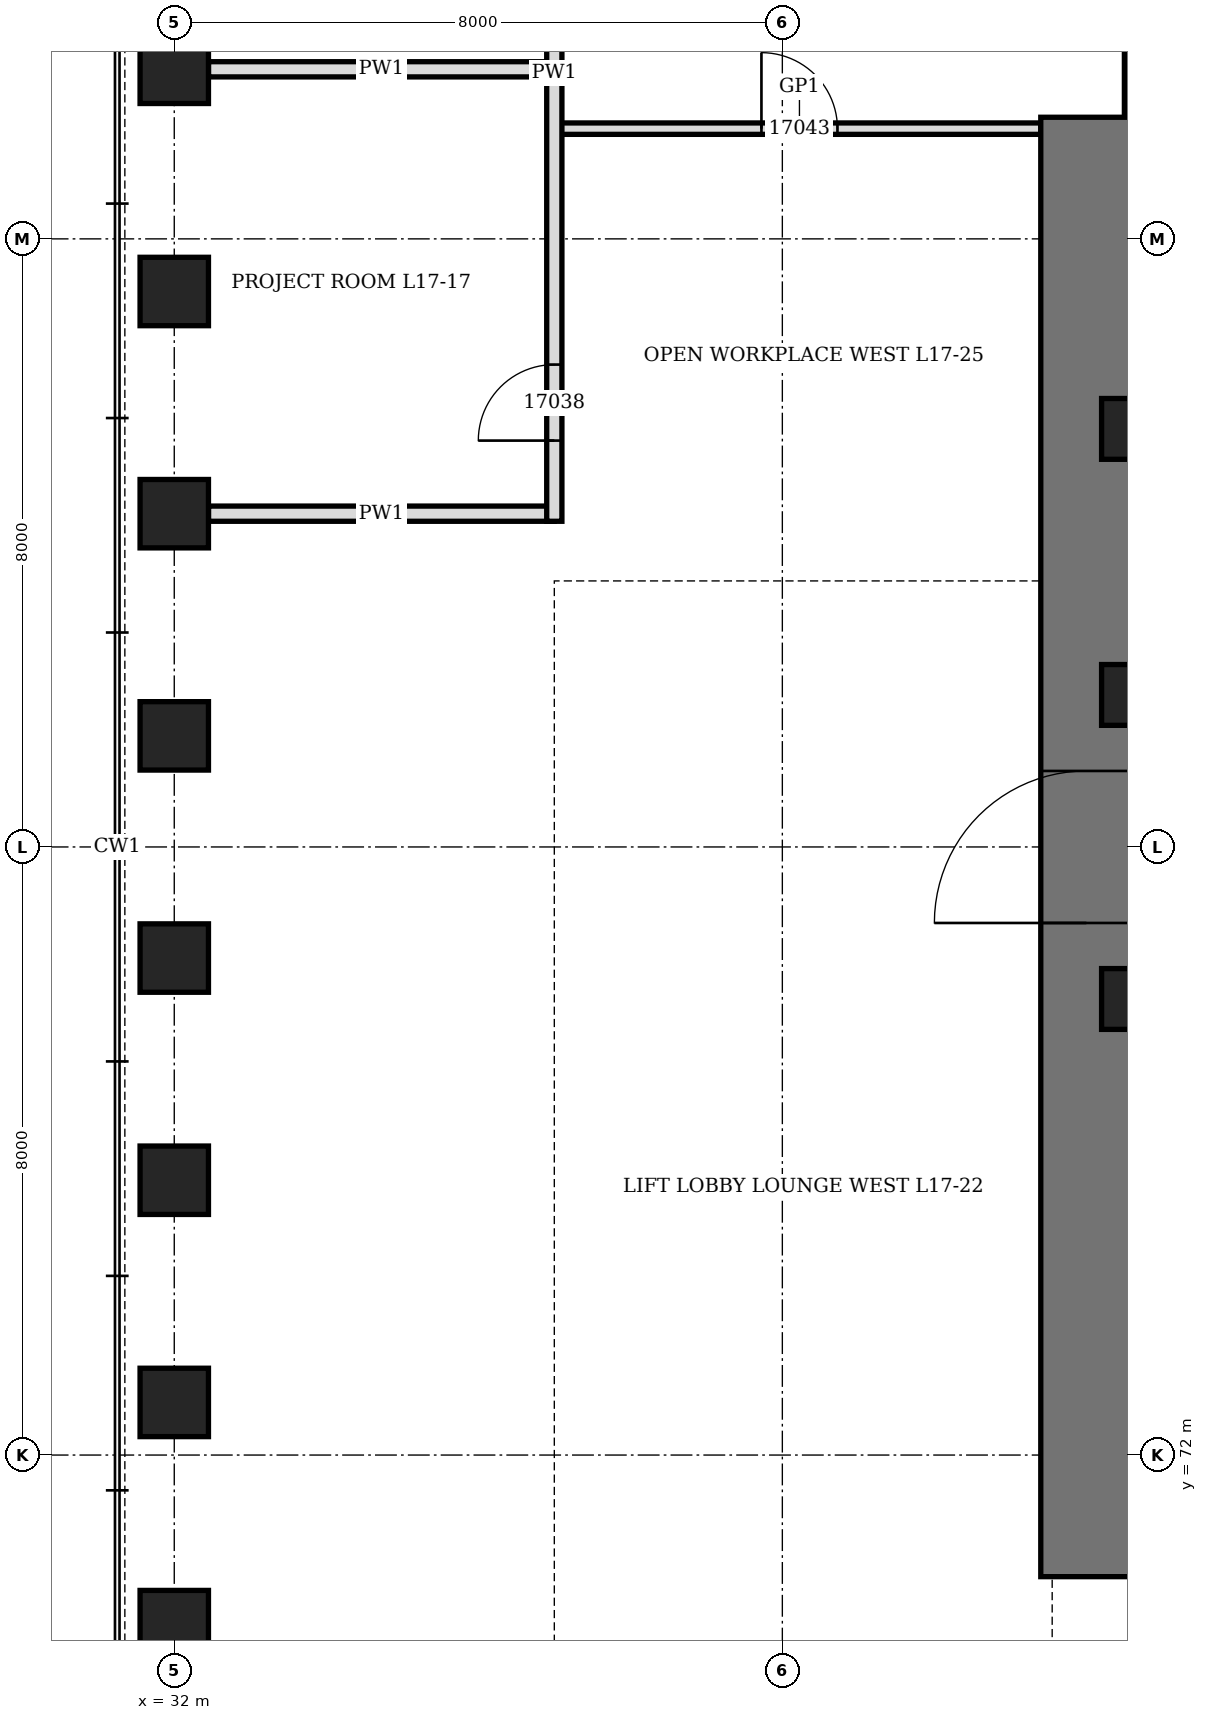
"""IFC4 building model, lengths in metres.
Left out: names, types, materials, properties, quantities, classifications, styles, units other than length and angle.
Written with IfcOpenShell. Run it as: python <this file> out.ifc"""

import sys

from ifc_helpers import new_model, si_unit, direction, frame, frame_2d, origin, origin_2d, place, context, subcontext, project, spatial, rectangle, hollow_rectangle, extrude, element, fill, save


model = new_model("IFC4")
c1 = context("Model", 3, precision=1e-05, world=origin(), true_north=direction((0.0, 1.0)))
c2 = subcontext(c1, "Body", "Model", "MODEL_VIEW")
j1 = project(units=[si_unit("LENGTHUNIT", "METRE"), si_unit("PLANEANGLEUNIT", "RADIAN")], contexts=[c1])
p1 = place(None, origin())
s1 = spatial("IfcSite", under=j1, at=p1, CompositionType="ELEMENT")
p2 = place(p1, origin())
s2 = spatial("IfcBuilding", under=s1, at=p2, CompositionType="ELEMENT")
p3 = place(p2, frame((0.0, 0.0, 81.1)))
s3 = spatial("IfcBuildingStorey", under=s2, at=p3, CompositionType="ELEMENT", Elevation=81.1)
for number, where, z_axis, x_axis in (
    (1, (32.0, 90.231, 0.0), (0.0, 0.0, 1.0), (0.0, 1.0, 0.0)),
    (2, (32.0, 87.308, 0.0), (0.0, 0.0, 1.0), (0.0, 1.0, 0.0)),
    (3, (32.0, 84.385, 0.0), (0.0, 0.0, 1.0), (0.0, 1.0, 0.0)),
    (4, (32.0, 81.461, 0.0), (0.0, 0.0, 1.0), (0.0, 1.0, 0.0)),
    (5, (32.0, 78.539, 0.0), (0.0, 0.0, 1.0), (0.0, 1.0, 0.0)),
    (6, (32.0, 75.615, 0.0), (0.0, 0.0, 1.0), (0.0, 1.0, 0.0)),
    (7, (32.0, 72.692, 0.0), (0.0, 0.0, 1.0), (0.0, 1.0, 0.0)),
    (8, (32.0, 69.769, 0.0), (0.0, 0.0, 1.0), (0.0, 1.0, 0.0)),
):
    element("IfcColumn", number, at=place(p3, frame(where, z_axis=z_axis, x_axis=x_axis)), inside=s3, PredefinedType="COLUMN", context=c2, shape_type="SweptSolid", body=[
        extrude(hollow_rectangle(XDim=0.9, YDim=0.9, WallThickness=0.12, at=origin_2d()), origin(), (0.0, 0.0, 1.0), 4.2),
    ])
p4 = place(p3, frame((44.0, 70.4, 0.0), z_axis=(0.0, 0.0, 1.0), x_axis=(0.0, 1.0, 0.0)))
e9 = element("IfcWall", 9, at=p4, inside=s3, PredefinedType="SHEAR", context=c2, shape_type="SweptSolid", body=[
    extrude(rectangle(XDim=19.2, YDim=1.2, at=frame_2d((9.6, 0.0))), origin(), (0.0, 0.0, 1.0), 4.2),
])
p5 = place(p4, frame((8.6, 0.0, 0.0)))
e10 = element("IfcOpeningElement", 10, at=p5, cuts=e9, PredefinedType="OPENING", context=c2, shape_type="SweptSolid", body=[
    extrude(rectangle(XDim=2.0, YDim=2.4, at=frame_2d((1.0, 1.2))), frame((0.0, 0.61, 0.0), z_axis=(0.0, -1.0, 0.0), x_axis=(1.0, 0.0, 0.0)), (0.0, 0.0, 1.0), 1.22),
])
for number, where, z_axis, x_axis in (
    (11, (44.6, 78.0, 0.0), (0.0, 0.0, 1.0), (1.0, 0.0, 0.0)),
    (12, (44.6, 82.0, 0.0), (0.0, 0.0, 1.0), (1.0, 0.0, 0.0)),
    (13, (44.6, 85.5, 0.0), (0.0, 0.0, 1.0), (1.0, 0.0, 0.0)),
):
    element("IfcColumn", number, at=place(p3, frame(where, z_axis=z_axis, x_axis=x_axis)), inside=s3, PredefinedType="COLUMN", context=c2, shape_type="SweptSolid", body=[
        extrude(hollow_rectangle(XDim=0.8, YDim=0.8, WallThickness=0.1, at=origin_2d()), origin(), (0.0, 0.0, 1.0), 4.2),
    ])
for number, where, z_axis, x_axis in (
    (14, (32.45, 84.385, 0.0), (0.0, 0.0, 1.0), (1.0, 0.0, 0.0)),
    (15, (32.45, 90.231, 0.0), (0.0, 0.0, 1.0), (1.0, 0.0, 0.0)),
):
    element("IfcWall", number, at=place(p3, frame(where, z_axis=z_axis, x_axis=x_axis)), inside=s3, PredefinedType="PARTITIONING", context=c2, shape_type="SweptSolid", body=[
        extrude(rectangle(XDim=4.55, YDim=0.2, at=frame_2d((2.275, 0.0))), origin(), (0.0, 0.0, 1.0), 3.428),
    ])
p6 = place(p3, frame((44.6, 89.6, 0.0), z_axis=(0.0, 0.0, 1.0), x_axis=(0.0, 1.0, 0.0)))
e16 = element("IfcWall", 16, at=p6, inside=s3, PredefinedType="PARTITIONING", context=c2, shape_type="SweptSolid", body=[
    extrude(rectangle(XDim=3.0, YDim=0.2, at=frame_2d((1.5, 0.0))), origin(), (0.0, 0.0, 1.0), 4.04),
])
p7 = place(p3, frame((37.05, 89.45, 0.0), z_axis=(0.0, 0.0, 1.0), x_axis=(1.0, 0.0, 0.0)))
e17 = element("IfcWall", 17, at=p7, inside=s3, PredefinedType="PARTITIONING", context=c2, shape_type="SweptSolid", body=[
    extrude(rectangle(XDim=6.35, YDim=0.15, at=frame_2d((3.175, 0.0))), origin(), (0.0, 0.0, 1.0), 4.04),
])
p8 = place(p7, frame((2.675, 0.0, 0.0)))
e18 = element("IfcOpeningElement", 18, at=p8, cuts=e17, PredefinedType="OPENING", context=c2, shape_type="SweptSolid", body=[
    extrude(rectangle(XDim=1.0, YDim=2.4, at=frame_2d((0.5, 1.2))), frame((0.0, 0.085, 0.0), z_axis=(0.0, -1.0, 0.0), x_axis=(1.0, 0.0, 0.0)), (0.0, 0.0, 1.0), 0.17),
])
p9 = place(p3, frame((37.0, 84.285, 0.0), z_axis=(0.0, 0.0, 1.0), x_axis=(0.0, 1.0, 0.0)))
e19 = element("IfcWall", 19, at=p9, inside=s3, PredefinedType="PARTITIONING", context=c2, shape_type="SweptSolid", body=[
    extrude(rectangle(XDim=11.792, YDim=0.2, at=frame_2d((5.896, 0.0))), origin(), (0.0, 0.0, 1.0), 4.04),
])
p10 = place(p9, frame((1.062, 0.0, 0.0)))
e20 = element("IfcOpeningElement", 20, at=p10, cuts=e19, PredefinedType="OPENING", context=c2, shape_type="SweptSolid", body=[
    extrude(rectangle(XDim=1.0, YDim=2.1, at=frame_2d((0.5, 1.05))), frame((0.0, 0.11, 0.0), z_axis=(0.0, -1.0, 0.0), x_axis=(1.0, 0.0, 0.0)), (0.0, 0.0, 1.0), 0.22),
])
p11 = place(p9, frame((6.908, 0.0, 0.0)))
e21 = element("IfcOpeningElement", 21, at=p11, cuts=e19, PredefinedType="OPENING", context=c2, shape_type="SweptSolid", body=[
    extrude(rectangle(XDim=1.0, YDim=2.1, at=frame_2d((0.5, 1.05))), frame((0.0, 0.11, 0.0), z_axis=(0.0, -1.0, 0.0), x_axis=(1.0, 0.0, 0.0)), (0.0, 0.0, 1.0), 0.22),
])
p12 = place(p5, origin())
e22 = element("IfcDoor", 22, at=p12, inside=s3, OperationType="DOUBLE_DOOR_SINGLE_SWING", PredefinedType="DOOR", context=c2, shape_type="SweptSolid", body=[
    extrude(rectangle(XDim=2.0, YDim=2.4, at=frame_2d((1.0, 1.2))), frame((0.0, 0.35, 0.0), z_axis=(0.0, -1.0, 0.0), x_axis=(1.0, 0.0, 0.0)), (0.0, 0.0, 1.0), 0.7),
])
fill(e10, e22)
p13 = place(p10, origin())
e23 = element("IfcDoor", 23, at=p13, inside=s3, OperationType="SINGLE_SWING_LEFT", PredefinedType="DOOR", context=c2, shape_type="SweptSolid", body=[
    extrude(rectangle(XDim=1.0, YDim=2.1, at=frame_2d((0.5, 1.05))), frame((0.0, 0.1, 0.0), z_axis=(0.0, -1.0, 0.0), x_axis=(1.0, 0.0, 0.0)), (0.0, 0.0, 1.0), 0.199),
])
fill(e20, e23)
p14 = place(p8, origin())
e24 = element("IfcDoor", 24, at=p14, inside=s3, OperationType="SINGLE_SWING_RIGHT", PredefinedType="DOOR", context=c2, shape_type="SweptSolid", body=[
    extrude(rectangle(XDim=1.0, YDim=2.4, at=frame_2d((0.5, 1.2))), frame((0.0, 0.075, 0.0), z_axis=(0.0, -1.0, 0.0), x_axis=(1.0, 0.0, 0.0)), (0.0, 0.0, 1.0), 0.149),
])
fill(e18, e24)
save(model, sys.argv[1])
